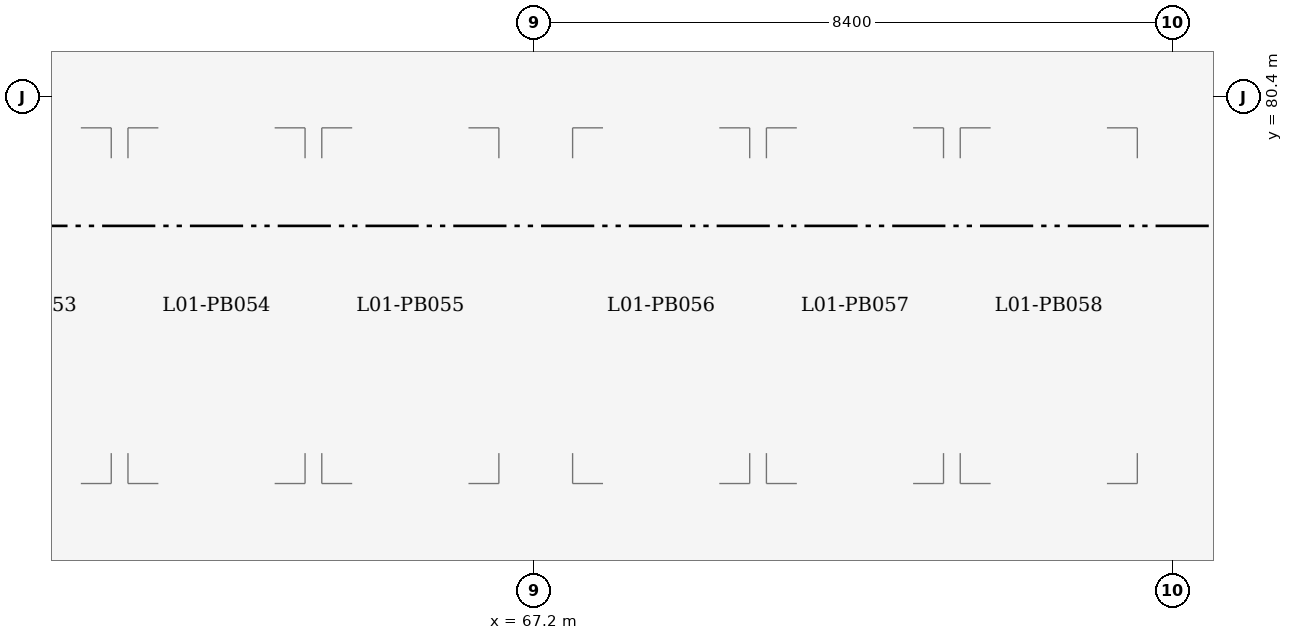
"""IFC4 building model, lengths in metres.
Left out: names, types, materials, properties, quantities, classifications, styles, units other than length and angle.
Written with IfcOpenShell. Run it as: python <this file> out.ifc"""

import sys

from ifc_helpers import new_model, si_unit, direction, frame, origin, origin_2d, place, context, subcontext, project, spatial, i_section, extrude, element, save


model = new_model("IFC4")
c1 = context("Model", 3, precision=1e-05, world=origin(), true_north=direction((0.0, 1.0)))
c2 = subcontext(c1, "Body", "Model", "MODEL_VIEW")
j1 = project(units=[si_unit("LENGTHUNIT", "METRE"), si_unit("PLANEANGLEUNIT", "RADIAN")], contexts=[c1])
p1 = place(None, origin())
s1 = spatial("IfcSite", under=j1, at=p1, CompositionType="ELEMENT")
p2 = place(p1, origin())
s2 = spatial("IfcBuilding", under=s1, at=p2, CompositionType="ELEMENT")
p3 = place(p2, frame((0.0, 0.0, 5.4)))
s3 = spatial("IfcBuildingStorey", under=s2, at=p3, CompositionType="ELEMENT", Elevation=5.4)
for number, where, z_axis, x_axis in (
    (1, (67.2, 80.4, 0.0), (0.0, 0.0, 1.0), (1.0, 0.0, 0.0)),
    (2, (75.6, 80.4, 0.0), (0.0, 0.0, 1.0), (1.0, 0.0, 0.0)),
):
    element("IfcColumn", number, at=place(p3, frame(where, z_axis=z_axis, x_axis=x_axis)), inside=s3, PredefinedType="COLUMN", context=c2, shape_type="SweptSolid", body=[
        extrude(i_section(OverallWidth=0.395, OverallDepth=0.381, WebThickness=0.018, FlangeThickness=0.03, FilletRadius=0.015, at=origin_2d()), origin(), (0.0, 0.0, 1.0), 3.6),
    ])
save(model, sys.argv[1])
